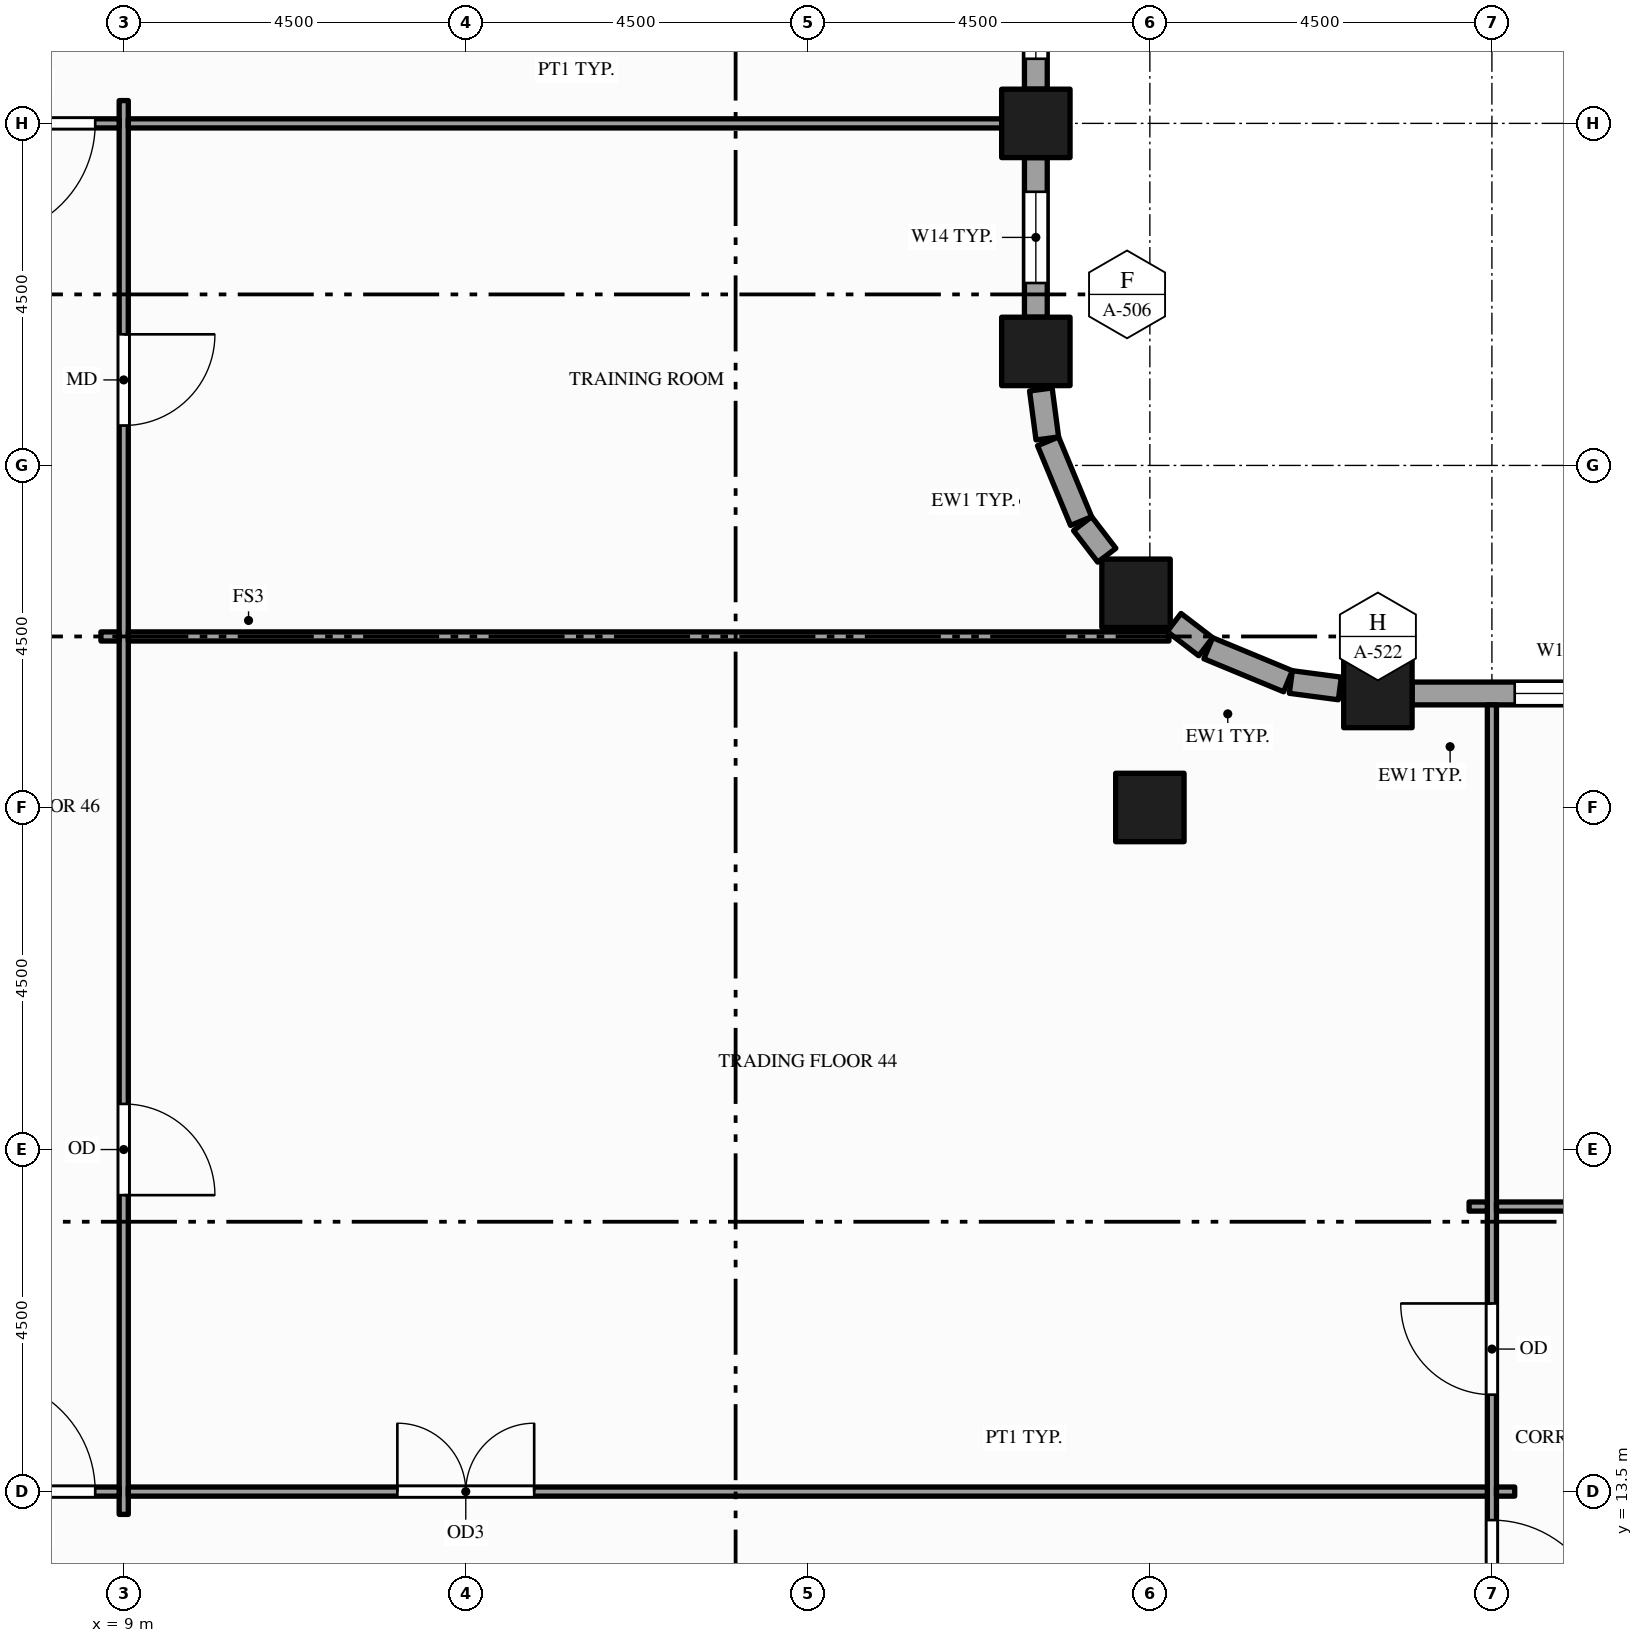
"""IFC4 building model, lengths in metres.
Left out: names, types, materials, properties, quantities, classifications, styles, units other than length and angle.
Written with IfcOpenShell. Run it as: python <this file> out.ifc"""

import sys

from ifc_helpers import new_model, si_unit, direction, frame, frame_2d, origin, origin_2d, place, context, subcontext, project, spatial, rectangle, hollow_rectangle, extrude, element, fill, save


model = new_model("IFC4")
c1 = context("Model", 3, precision=1e-05, world=origin(), true_north=direction((0.0, 1.0)))
c2 = subcontext(c1, "Body", "Model", "MODEL_VIEW")
j1 = project(units=[si_unit("LENGTHUNIT", "METRE"), si_unit("PLANEANGLEUNIT", "RADIAN")], contexts=[c1])
p1 = place(None, origin())
s1 = spatial("IfcSite", under=j1, at=p1, CompositionType="ELEMENT")
p2 = place(p1, origin())
s2 = spatial("IfcBuilding", under=s1, at=p2, CompositionType="ELEMENT")
p3 = place(p2, frame((0.0, 0.0, 171.0)))
s3 = spatial("IfcBuildingStorey", under=s2, at=p3, CompositionType="ELEMENT", Elevation=171.0)
for number, where, z_axis, x_axis in (
    (1, (21.0, 28.5, -0.15), (0.0, 0.0, 1.0), (1.0, 0.0, 0.0)),
    (2, (21.0, 31.5, -0.15), (0.0, 0.0, 1.0), (1.0, 0.0, 0.0)),
    (3, (22.318, 25.318, -0.15), (0.0, 0.0, 1.0), (1.0, 0.0, 0.0)),
    (4, (22.5, 22.5, -0.15), (0.0, 0.0, 1.0), (1.0, 0.0, 0.0)),
    (5, (25.5, 24.0, -0.15), (0.0, 0.0, 1.0), (1.0, 0.0, 0.0)),
):
    element("IfcColumn", number, at=place(p3, frame(where, z_axis=z_axis, x_axis=x_axis)), inside=s3, PredefinedType="COLUMN", context=c2, shape_type="SweptSolid", body=[
        extrude(hollow_rectangle(XDim=0.9, YDim=0.9, WallThickness=0.045, at=origin_2d()), origin(), (0.0, 0.0, 1.0), 4.0),
    ])
p4 = place(p3, frame((31.05, 24.0, 0.0), z_axis=(0.0, 0.0, 1.0), x_axis=(-1.0, 0.0, 0.0)))
e6 = element("IfcWall", 6, at=p4, inside=s3, PredefinedType="STANDARD", context=c2, shape_type="SweptSolid", body=[
    extrude(rectangle(XDim=5.1, YDim=0.3, at=frame_2d((2.55, 0.0))), origin(), (0.0, 0.0, 1.0), 2.87),
])
p5 = place(p4, frame((0.4, 0.0, 0.9)))
e7 = element("IfcOpeningElement", 7, at=p5, cuts=e6, PredefinedType="OPENING", context=c2, shape_type="SweptSolid", body=[
    extrude(rectangle(XDim=1.1, YDim=1.75, at=frame_2d((0.55, 0.875))), frame((0.0, 0.16, 0.0), z_axis=(0.0, -1.0, 0.0), x_axis=(1.0, 0.0, 0.0)), (0.0, 0.0, 1.0), 0.32),
])
p6 = place(p4, frame((2.1, 0.0, 0.9)))
e8 = element("IfcOpeningElement", 8, at=p6, cuts=e6, PredefinedType="OPENING", context=c2, shape_type="SweptSolid", body=[
    extrude(rectangle(XDim=1.65, YDim=1.75, at=frame_2d((0.825, 0.875))), frame((0.0, 0.16, 0.0), z_axis=(0.0, -1.0, 0.0), x_axis=(1.0, 0.0, 0.0)), (0.0, 0.0, 1.0), 0.32),
])
p7 = place(p3, frame((25.0, 24.066, 0.0), z_axis=(0.0, 0.0, 1.0), x_axis=(-0.991423590996, 0.130687655177, 0.0)))
e9 = element("IfcWall", 9, at=p7, inside=s3, PredefinedType="STANDARD", context=c2, shape_type="SweptSolid", body=[
    extrude(rectangle(XDim=0.65, YDim=0.3, at=frame_2d((0.325, 0.0))), origin(), (0.0, 0.0, 1.0), 2.87),
])
p8 = place(p3, frame((24.317, 24.161, 0.0), z_axis=(0.0, 0.0, 1.0), x_axis=(-0.923914616768, 0.382598720491, 0.0)))
e10 = element("IfcWall", 10, at=p8, inside=s3, PredefinedType="STANDARD", context=c2, shape_type="SweptSolid", body=[
    extrude(rectangle(XDim=1.135, YDim=0.3, at=frame_2d((0.568, 0.0))), origin(), (0.0, 0.0, 1.0), 3.149),
])
for number, where, z_axis, x_axis in (
    (11, (23.234, 24.615, 0.0), (0.0, 0.0, 1.0), (-0.794, 0.609, 0.0)),
    (12, (21.934, 25.819, 0.0), (0.0, 0.0, 1.0), (-0.609, 0.794, 0.0)),
):
    element("IfcWall", number, at=place(p3, frame(where, z_axis=z_axis, x_axis=x_axis)), inside=s3, PredefinedType="STANDARD", context=c2, shape_type="SweptSolid", body=[
        extrude(rectangle(XDim=0.524, YDim=0.3, at=frame_2d((0.262, 0.0))), origin(), (0.0, 0.0, 1.0), 3.149),
    ])
p9 = place(p3, frame((21.595, 26.268, 0.0), z_axis=(0.0, 0.0, 1.0), x_axis=(-0.382598720491, 0.923914616768, 0.0)))
e13 = element("IfcWall", 13, at=p9, inside=s3, PredefinedType="STANDARD", context=c2, shape_type="SweptSolid", body=[
    extrude(rectangle(XDim=1.135, YDim=0.3, at=frame_2d((0.568, 0.0))), origin(), (0.0, 0.0, 1.0), 3.149),
])
p10 = place(p3, frame((21.151, 27.355, 0.0), z_axis=(0.0, 0.0, 1.0), x_axis=(-0.130687655177, 0.991423590996, 0.0)))
e14 = element("IfcWall", 14, at=p10, inside=s3, PredefinedType="STANDARD", context=c2, shape_type="SweptSolid", body=[
    extrude(rectangle(XDim=0.65, YDim=0.3, at=frame_2d((0.325, 0.0))), origin(), (0.0, 0.0, 1.0), 3.149),
])
p11 = place(p3, frame((21.0, 28.95, 0.0), z_axis=(0.0, 0.0, 1.0), x_axis=(0.0, 1.0, 0.0)))
e15 = element("IfcWall", 15, at=p11, inside=s3, PredefinedType="STANDARD", context=c2, shape_type="SweptSolid", body=[
    extrude(rectangle(XDim=2.1, YDim=0.3, at=frame_2d((1.05, 0.0))), origin(), (0.0, 0.0, 1.0), 3.149),
])
p12 = place(p11, frame((0.45, 0.0, 0.9)))
e16 = element("IfcOpeningElement", 16, at=p12, cuts=e15, PredefinedType="OPENING", context=c2, shape_type="SweptSolid", body=[
    extrude(rectangle(XDim=1.2, YDim=2.0, at=frame_2d((0.6, 1.0))), frame((0.0, 0.16, 0.0), z_axis=(0.0, -1.0, 0.0), x_axis=(1.0, 0.0, 0.0)), (0.0, 0.0, 1.0), 0.32),
])
p13 = place(p3, frame((21.0, 31.95, 0.0), z_axis=(0.0, 0.0, 1.0), x_axis=(0.0, 1.0, 0.0)))
e17 = element("IfcWall", 17, at=p13, inside=s3, PredefinedType="STANDARD", context=c2, shape_type="SweptSolid", body=[
    extrude(rectangle(XDim=4.05, YDim=0.3, at=frame_2d((2.025, 0.0))), origin(), (0.0, 0.0, 1.0), 3.149),
])
p14 = place(p13, frame((0.4, 0.0, 0.9)))
e18 = element("IfcOpeningElement", 18, at=p14, cuts=e17, PredefinedType="OPENING", context=c2, shape_type="SweptSolid", body=[
    extrude(rectangle(XDim=1.1, YDim=2.0, at=frame_2d((0.55, 1.0))), frame((0.0, 0.16, 0.0), z_axis=(0.0, -1.0, 0.0), x_axis=(1.0, 0.0, 0.0)), (0.0, 0.0, 1.0), 0.32),
])
p15 = place(p13, frame((2.1, 0.0, 0.9)))
e19 = element("IfcOpeningElement", 19, at=p15, cuts=e17, PredefinedType="OPENING", context=c2, shape_type="SweptSolid", body=[
    extrude(rectangle(XDim=1.55, YDim=2.0, at=frame_2d((0.775, 1.0))), frame((0.0, 0.16, 0.0), z_axis=(0.0, -1.0, 0.0), x_axis=(1.0, 0.0, 0.0)), (0.0, 0.0, 1.0), 0.32),
])
p16 = place(p3, frame((9.0, 13.2, 0.0), z_axis=(0.0, 0.0, 1.0), x_axis=(0.0, 1.0, 0.0)))
e20 = element("IfcWall", 20, at=p16, inside=s3, PredefinedType="PARTITIONING", context=c2, shape_type="SweptSolid", body=[
    extrude(rectangle(XDim=18.6, YDim=0.12, at=frame_2d((9.3, 0.0))), origin(), (0.0, 0.0, 1.0), 2.6),
])
p17 = place(p16, frame((14.325, 0.0, 0.0)))
e21 = element("IfcOpeningElement", 21, at=p17, cuts=e20, PredefinedType="OPENING", context=c2, shape_type="SweptSolid", body=[
    extrude(rectangle(XDim=1.2, YDim=2.1, at=frame_2d((0.6, 1.05))), frame((0.0, 0.07, 0.0), z_axis=(0.0, -1.0, 0.0), x_axis=(1.0, 0.0, 0.0)), (0.0, 0.0, 1.0), 0.14),
])
p18 = place(p16, frame((4.2, 0.0, 0.0)))
e22 = element("IfcOpeningElement", 22, at=p18, cuts=e20, PredefinedType="OPENING", context=c2, shape_type="SweptSolid", body=[
    extrude(rectangle(XDim=1.2, YDim=2.1, at=frame_2d((0.6, 1.05))), frame((0.0, 0.07, 0.0), z_axis=(0.0, -1.0, 0.0), x_axis=(1.0, 0.0, 0.0)), (0.0, 0.0, 1.0), 0.14),
])
p19 = place(p3, frame((27.0, 1.65, 0.0), z_axis=(0.0, 0.0, 1.0), x_axis=(0.0, 1.0, 0.0)))
e23 = element("IfcWall", 23, at=p19, inside=s3, PredefinedType="PARTITIONING", context=c2, shape_type="SweptSolid", body=[
    extrude(rectangle(XDim=22.2, YDim=0.12, at=frame_2d((11.1, 0.0))), origin(), (0.0, 0.0, 1.0), 2.87),
])
p20 = place(p19, frame((9.975, 0.0, 0.0)))
e24 = element("IfcOpeningElement", 24, at=p20, cuts=e23, PredefinedType="OPENING", context=c2, shape_type="SweptSolid", body=[
    extrude(rectangle(XDim=1.5, YDim=2.1, at=frame_2d((0.75, 1.05))), frame((0.0, 0.07, 0.0), z_axis=(0.0, -1.0, 0.0), x_axis=(1.0, 0.0, 0.0)), (0.0, 0.0, 1.0), 0.14),
])
p21 = place(p19, frame((13.125, 0.0, 0.0)))
e25 = element("IfcOpeningElement", 25, at=p21, cuts=e23, PredefinedType="OPENING", context=c2, shape_type="SweptSolid", body=[
    extrude(rectangle(XDim=1.2, YDim=2.1, at=frame_2d((0.6, 1.05))), frame((0.0, 0.07, 0.0), z_axis=(0.0, -1.0, 0.0), x_axis=(1.0, 0.0, 0.0)), (0.0, 0.0, 1.0), 0.14),
])
p22 = place(p3, frame((6.81, 13.5, 0.0), z_axis=(0.0, 0.0, 1.0), x_axis=(1.0, 0.0, 0.0)))
e26 = element("IfcWall", 26, at=p22, inside=s3, PredefinedType="PARTITIONING", context=c2, shape_type="SweptSolid", body=[
    extrude(rectangle(XDim=2.13, YDim=0.12, at=frame_2d((1.065, 0.0))), origin(), (0.0, 0.0, 1.0), 2.87),
])
p23 = place(p22, frame((0.315, 0.0, 0.0)))
e27 = element("IfcOpeningElement", 27, at=p23, cuts=e26, PredefinedType="OPENING", context=c2, shape_type="SweptSolid", body=[
    extrude(rectangle(XDim=1.5, YDim=2.1, at=frame_2d((0.75, 1.05))), frame((0.0, 0.07, 0.0), z_axis=(0.0, -1.0, 0.0), x_axis=(1.0, 0.0, 0.0)), (0.0, 0.0, 1.0), 0.14),
])
p24 = place(p3, frame((9.06, 13.5, 0.0), z_axis=(0.0, 0.0, 1.0), x_axis=(1.0, 0.0, 0.0)))
e28 = element("IfcWall", 28, at=p24, inside=s3, PredefinedType="PARTITIONING", context=c2, shape_type="SweptSolid", body=[
    extrude(rectangle(XDim=17.88, YDim=0.12, at=frame_2d((8.94, 0.0))), origin(), (0.0, 0.0, 1.0), 2.87),
])
p25 = place(p24, frame((3.54, 0.0, 0.0)))
e29 = element("IfcOpeningElement", 29, at=p25, cuts=e28, PredefinedType="OPENING", context=c2, shape_type="SweptSolid", body=[
    extrude(rectangle(XDim=1.8, YDim=2.1, at=frame_2d((0.9, 1.05))), frame((0.0, 0.07, 0.0), z_axis=(0.0, -1.0, 0.0), x_axis=(1.0, 0.0, 0.0)), (0.0, 0.0, 1.0), 0.14),
])
for number, where, z_axis, x_axis in (
    (30, (27.06, 13.5, 0.0), (0.0, 0.0, 1.0), (1.0, 0.0, 0.0)),
    (31, (26.7, 17.25, 0.0), (0.0, 0.0, 1.0), (1.0, 0.0, 0.0)),
):
    element("IfcWall", number, at=place(p3, frame(where, z_axis=z_axis, x_axis=x_axis)), inside=s3, PredefinedType="PARTITIONING", context=c2, shape_type="SweptSolid", body=[
        extrude(rectangle(XDim=0.24, YDim=0.12, at=frame_2d((0.12, 0.0))), origin(), (0.0, 0.0, 1.0), 2.87),
    ])
p26 = place(p3, frame((27.06, 17.25, 0.0), z_axis=(0.0, 0.0, 1.0), x_axis=(1.0, 0.0, 0.0)))
e32 = element("IfcWall", 32, at=p26, inside=s3, PredefinedType="PARTITIONING", context=c2, shape_type="SweptSolid", body=[
    extrude(rectangle(XDim=2.13, YDim=0.12, at=frame_2d((1.065, 0.0))), origin(), (0.0, 0.0, 1.0), 2.87),
])
p27 = place(p3, frame((8.7, 24.75, 0.0), z_axis=(0.0, 0.0, 1.0), x_axis=(1.0, 0.0, 0.0)))
e33 = element("IfcWall", 33, at=p27, inside=s3, PredefinedType="PARTITIONING", context=c2, shape_type="SweptSolid", body=[
    extrude(rectangle(XDim=0.24, YDim=0.12, at=frame_2d((0.12, 0.0))), origin(), (0.0, 0.0, 1.0), 2.87),
])
p28 = place(p3, frame((9.06, 24.75, 0.0), z_axis=(0.0, 0.0, 1.0), x_axis=(1.0, 0.0, 0.0)))
e34 = element("IfcWall", 34, at=p28, inside=s3, PredefinedType="PARTITIONING", context=c2, shape_type="SweptSolid", body=[
    extrude(rectangle(XDim=13.69, YDim=0.12, at=frame_2d((6.845, 0.0))), origin(), (0.0, 0.0, 1.0), 2.87),
])
p29 = place(p3, frame((6.81, 31.5, 0.0), z_axis=(0.0, 0.0, 1.0), x_axis=(1.0, 0.0, 0.0)))
e35 = element("IfcWall", 35, at=p29, inside=s3, PredefinedType="PARTITIONING", context=c2, shape_type="SweptSolid", body=[
    extrude(rectangle(XDim=2.13, YDim=0.12, at=frame_2d((1.065, 0.0))), origin(), (0.0, 0.0, 1.0), 2.87),
])
p30 = place(p29, frame((0.315, 0.0, 0.0)))
e36 = element("IfcOpeningElement", 36, at=p30, cuts=e35, PredefinedType="OPENING", context=c2, shape_type="SweptSolid", body=[
    extrude(rectangle(XDim=1.5, YDim=2.1, at=frame_2d((0.75, 1.05))), frame((0.0, 0.07, 0.0), z_axis=(0.0, -1.0, 0.0), x_axis=(1.0, 0.0, 0.0)), (0.0, 0.0, 1.0), 0.14),
])
p31 = place(p3, frame((9.06, 31.5, 0.0), z_axis=(0.0, 0.0, 1.0), x_axis=(1.0, 0.0, 0.0)))
e37 = element("IfcWall", 37, at=p31, inside=s3, PredefinedType="PARTITIONING", context=c2, shape_type="SweptSolid", body=[
    extrude(rectangle(XDim=11.79, YDim=0.12, at=frame_2d((5.895, 0.0))), origin(), (0.0, 0.0, 1.0), 2.87),
])
p32 = place(p6, origin())
e38 = element("IfcWindow", 38, at=p32, inside=s3, PartitioningType="SINGLE_PANEL", PredefinedType="WINDOW", context=c2, shape_type="SweptSolid", body=[
    extrude(rectangle(XDim=1.65, YDim=1.75, at=frame_2d((0.825, 0.875))), frame((0.0, 0.03, 0.0), z_axis=(0.0, -1.0, 0.0), x_axis=(1.0, 0.0, 0.0)), (0.0, 0.0, 1.0), 0.06),
])
fill(e8, e38)
p33 = place(p12, origin())
e39 = element("IfcWindow", 39, at=p33, inside=s3, PartitioningType="SINGLE_PANEL", PredefinedType="WINDOW", context=c2, shape_type="SweptSolid", body=[
    extrude(rectangle(XDim=1.2, YDim=2.0, at=frame_2d((0.6, 1.0))), frame((0.0, 0.03, 0.0), z_axis=(0.0, -1.0, 0.0), x_axis=(1.0, 0.0, 0.0)), (0.0, 0.0, 1.0), 0.06),
])
fill(e16, e39)
p34 = place(p14, origin())
e40 = element("IfcWindow", 40, at=p34, inside=s3, PartitioningType="SINGLE_PANEL", PredefinedType="WINDOW", context=c2, shape_type="SweptSolid", body=[
    extrude(rectangle(XDim=1.1, YDim=2.0, at=frame_2d((0.55, 1.0))), frame((0.0, 0.03, 0.0), z_axis=(0.0, -1.0, 0.0), x_axis=(1.0, 0.0, 0.0)), (0.0, 0.0, 1.0), 0.06),
])
fill(e18, e40)
p35 = place(p20, origin())
e41 = element("IfcDoor", 41, at=p35, inside=s3, OperationType="SINGLE_SWING_LEFT", PredefinedType="DOOR", context=c2, shape_type="SweptSolid", body=[
    extrude(rectangle(XDim=1.5, YDim=2.1, at=frame_2d((0.75, 1.05))), frame((0.0, 0.025, 0.0), z_axis=(0.0, -1.0, 0.0), x_axis=(1.0, 0.0, 0.0)), (0.0, 0.0, 1.0), 0.05),
])
fill(e24, e41)
p36 = place(p25, origin())
e42 = element("IfcDoor", 42, at=p36, inside=s3, OperationType="DOUBLE_DOOR_SINGLE_SWING", PredefinedType="DOOR", context=c2, shape_type="SweptSolid", body=[
    extrude(rectangle(XDim=1.8, YDim=2.1, at=frame_2d((0.9, 1.05))), frame((0.0, 0.025, 0.0), z_axis=(0.0, -1.0, 0.0), x_axis=(1.0, 0.0, 0.0)), (0.0, 0.0, 1.0), 0.05),
])
fill(e29, e42)
p37 = place(p23, origin())
e43 = element("IfcDoor", 43, at=p37, inside=s3, OperationType="SINGLE_SWING_LEFT", PredefinedType="DOOR", context=c2, shape_type="SweptSolid", body=[
    extrude(rectangle(XDim=1.5, YDim=2.1, at=frame_2d((0.75, 1.05))), frame((0.0, 0.025, 0.0), z_axis=(0.0, -1.0, 0.0), x_axis=(1.0, 0.0, 0.0)), (0.0, 0.0, 1.0), 0.05),
])
fill(e27, e43)
p38 = place(p30, origin())
e44 = element("IfcDoor", 44, at=p38, inside=s3, OperationType="SINGLE_SWING_LEFT", PredefinedType="DOOR", context=c2, shape_type="SweptSolid", body=[
    extrude(rectangle(XDim=1.5, YDim=2.1, at=frame_2d((0.75, 1.05))), frame((0.0, 0.025, 0.0), z_axis=(0.0, -1.0, 0.0), x_axis=(1.0, 0.0, 0.0)), (0.0, 0.0, 1.0), 0.05),
])
fill(e36, e44)
p39 = place(p17, origin())
e45 = element("IfcDoor", 45, at=p39, inside=s3, OperationType="SINGLE_SWING_RIGHT", PredefinedType="DOOR", context=c2, shape_type="SweptSolid", body=[
    extrude(rectangle(XDim=1.2, YDim=2.1, at=frame_2d((0.6, 1.05))), frame((0.0, 0.025, 0.0), z_axis=(0.0, -1.0, 0.0), x_axis=(1.0, 0.0, 0.0)), (0.0, 0.0, 1.0), 0.05),
])
fill(e21, e45)
p40 = place(p18, origin())
e46 = element("IfcDoor", 46, at=p40, inside=s3, OperationType="SINGLE_SWING_LEFT", PredefinedType="DOOR", context=c2, shape_type="SweptSolid", body=[
    extrude(rectangle(XDim=1.2, YDim=2.1, at=frame_2d((0.6, 1.05))), frame((0.0, 0.025, 0.0), z_axis=(0.0, -1.0, 0.0), x_axis=(1.0, 0.0, 0.0)), (0.0, 0.0, 1.0), 0.05),
])
fill(e22, e46)
p41 = place(p21, origin())
e47 = element("IfcDoor", 47, at=p41, inside=s3, OperationType="SINGLE_SWING_RIGHT", PredefinedType="DOOR", context=c2, shape_type="SweptSolid", body=[
    extrude(rectangle(XDim=1.2, YDim=2.1, at=frame_2d((0.6, 1.05))), frame((0.0, 0.025, 0.0), z_axis=(0.0, -1.0, 0.0), x_axis=(1.0, 0.0, 0.0)), (0.0, 0.0, 1.0), 0.05),
])
fill(e25, e47)
save(model, sys.argv[1])
